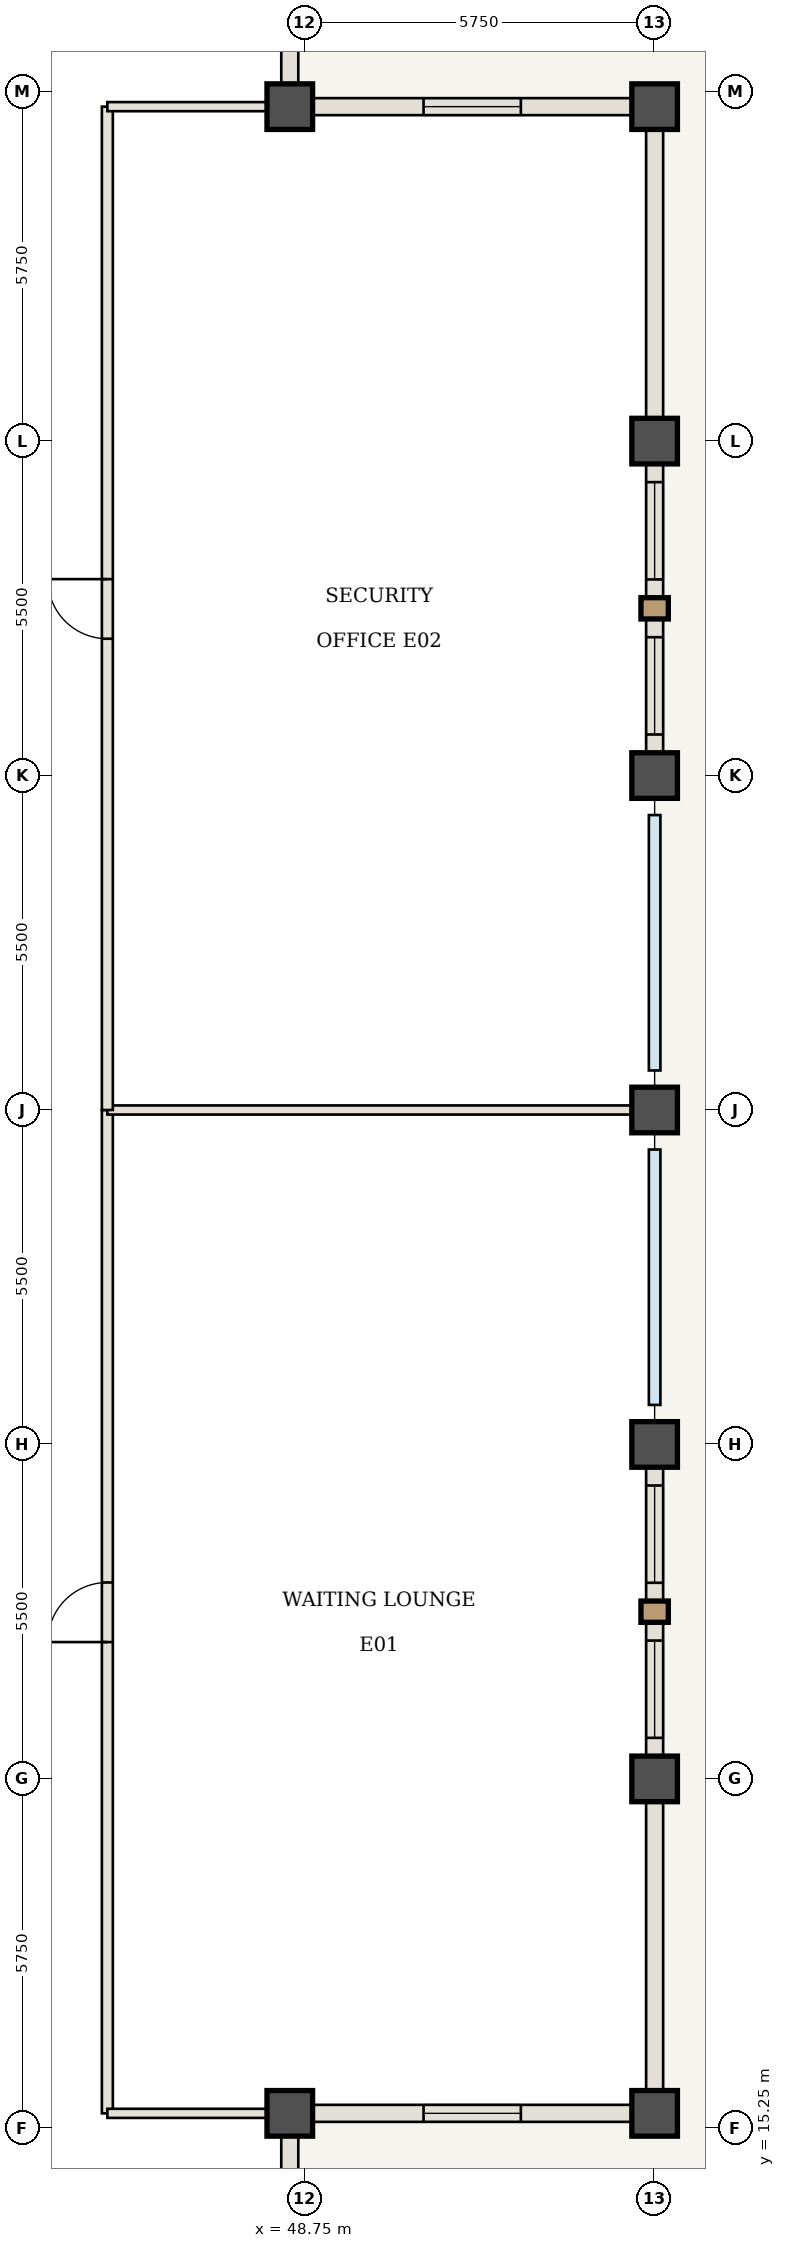
"""IFC4 building model, lengths in metres.
Left out: names, types, materials, properties, quantities, classifications, styles, units other than length and angle.
Written with IfcOpenShell. Run it as: python <this file> out.ifc"""

import sys

from ifc_helpers import new_model, si_unit, direction, frame, frame_2d, origin, origin_2d, place, context, subcontext, project, spatial, rectangle, extrude, element, fill, save


model = new_model("IFC4")
c1 = context("Model", 3, precision=1e-05, world=origin(), true_north=direction((0.0, 1.0)))
c2 = subcontext(c1, "Body", "Model", "MODEL_VIEW")
j1 = project(units=[si_unit("LENGTHUNIT", "METRE"), si_unit("PLANEANGLEUNIT", "RADIAN")], contexts=[c1])
p1 = place(None, origin())
s1 = spatial("IfcSite", under=j1, at=p1, CompositionType="ELEMENT")
p2 = place(p1, origin())
s2 = spatial("IfcBuilding", under=s1, at=p2, CompositionType="ELEMENT")
p3 = place(p2, frame((0.0, 0.0, 257.6)))
s3 = spatial("IfcBuildingStorey", under=s2, at=p3, CompositionType="ELEMENT", Elevation=257.6)
for number, where, z_axis, x_axis in (
    (1, (48.5, 15.5, -0.42), (0.0, 0.0, 1.0), (1.0, 0.0, 0.0)),
    (2, (54.5, 15.5, -0.42), (0.0, 0.0, 1.0), (1.0, 0.0, 0.0)),
    (3, (54.5, 48.5, -0.42), (0.0, 0.0, 1.0), (1.0, 0.0, 0.0)),
    (4, (48.5, 48.5, -0.42), (0.0, 0.0, 1.0), (1.0, 0.0, 0.0)),
    (5, (54.5, 21.0, -0.42), (0.0, 0.0, 1.0), (1.0, 0.0, 0.0)),
    (6, (54.5, 26.5, -0.42), (0.0, 0.0, 1.0), (1.0, 0.0, 0.0)),
    (7, (54.5, 32.0, -0.42), (0.0, 0.0, 1.0), (1.0, 0.0, 0.0)),
    (8, (54.5, 37.5, -0.42), (0.0, 0.0, 1.0), (1.0, 0.0, 0.0)),
    (9, (54.5, 43.0, -0.42), (0.0, 0.0, 1.0), (1.0, 0.0, 0.0)),
):
    element("IfcColumn", number, at=place(p3, frame(where, z_axis=z_axis, x_axis=x_axis)), inside=s3, PredefinedType="COLUMN", context=c2, shape_type="SweptSolid", body=[
        extrude(rectangle(XDim=0.75, YDim=0.75, at=origin_2d()), origin(), (0.0, 0.0, 1.0), 4.97),
    ])
p4 = place(p3, frame((45.5, 15.5, 0.0), z_axis=(0.0, 0.0, 1.0), x_axis=(0.0, 1.0, 0.0)))
e10 = element("IfcWall", 10, at=p4, inside=s3, PredefinedType="STANDARD", context=c2, shape_type="SweptSolid", body=[
    extrude(rectangle(XDim=16.5, YDim=0.18, at=frame_2d((8.25, 0.0))), origin(), (0.0, 0.0, 1.0), 4.13),
])
p5 = place(p4, frame((7.75, 0.0, 0.0)))
e11 = element("IfcOpeningElement", 11, at=p5, cuts=e10, PredefinedType="OPENING", context=c2, shape_type="SweptSolid", body=[
    extrude(rectangle(XDim=0.98, YDim=2.2, at=frame_2d((0.49, 1.1))), frame((0.0, 0.1, 0.0), z_axis=(0.0, -1.0, 0.0), x_axis=(1.0, 0.0, 0.0)), (0.0, 0.0, 1.0), 0.2),
])
p6 = place(p3, frame((45.5, 32.0, 0.0), z_axis=(0.0, 0.0, 1.0), x_axis=(1.0, 0.0, 0.0)))
e12 = element("IfcWall", 12, at=p6, inside=s3, PredefinedType="STANDARD", context=c2, shape_type="SweptSolid", body=[
    extrude(rectangle(XDim=8.94, YDim=0.15, at=frame_2d((4.47, 0.0))), origin(), (0.0, 0.0, 1.0), 3.585),
])
p7 = place(p3, frame((45.5, 32.0, 0.0), z_axis=(0.0, 0.0, 1.0), x_axis=(0.0, 1.0, 0.0)))
e13 = element("IfcWall", 13, at=p7, inside=s3, PredefinedType="STANDARD", context=c2, shape_type="SweptSolid", body=[
    extrude(rectangle(XDim=16.5, YDim=0.18, at=frame_2d((8.25, 0.0))), origin(), (0.0, 0.0, 1.0), 4.13),
])
p8 = place(p7, frame((7.75, 0.0, 0.0)))
e14 = element("IfcOpeningElement", 14, at=p8, cuts=e13, PredefinedType="OPENING", context=c2, shape_type="SweptSolid", body=[
    extrude(rectangle(XDim=0.98, YDim=2.2, at=frame_2d((0.49, 1.1))), frame((0.0, 0.1, 0.0), z_axis=(0.0, -1.0, 0.0), x_axis=(1.0, 0.0, 0.0)), (0.0, 0.0, 1.0), 0.2),
])
for number, where, z_axis, x_axis in (
    (15, (45.5, 15.5, 0.0), (0.0, 0.0, 1.0), (1.0, 0.0, 0.0)),
    (16, (45.5, 48.5, 0.0), (0.0, 0.0, 1.0), (1.0, 0.0, 0.0)),
):
    element("IfcWall", number, at=place(p3, frame(where, z_axis=z_axis, x_axis=x_axis)), inside=s3, PredefinedType="STANDARD", context=c2, shape_type="SweptSolid", body=[
        extrude(rectangle(XDim=3.0, YDim=0.15, at=frame_2d((1.5, 0.0))), origin(), (0.0, 0.0, 1.0), 4.13),
    ])
p9 = place(p3, frame((54.5, 21.0, 0.0), z_axis=(0.0, 0.0, 1.0), x_axis=(0.0, -1.0, 0.0)))
e17 = element("IfcWall", 17, at=p9, inside=s3, PredefinedType="USERDEFINED", context=c2, shape_type="SweptSolid", body=[
    extrude(rectangle(XDim=5.5, YDim=0.28, at=frame_2d((2.75, 0.0))), origin(), (0.0, 0.0, 1.0), 3.43),
])
p10 = place(p3, frame((54.5, 26.5, 0.0), z_axis=(0.0, 0.0, 1.0), x_axis=(0.0, -1.0, 0.0)))
e18 = element("IfcWall", 18, at=p10, inside=s3, PredefinedType="USERDEFINED", context=c2, shape_type="SweptSolid", body=[
    extrude(rectangle(XDim=5.5, YDim=0.28, at=frame_2d((2.75, 0.0))), origin(), (0.0, 0.0, 1.0), 3.43),
])
p11 = place(p10, frame((0.675, 0.0, 0.85)))
e19 = element("IfcOpeningElement", 19, at=p11, cuts=e18, PredefinedType="OPENING", context=c2, shape_type="SweptSolid", body=[
    extrude(rectangle(XDim=1.6, YDim=2.15, at=frame_2d((0.8, 1.075))), frame((0.0, 0.15, 0.0), z_axis=(0.0, -1.0, 0.0), x_axis=(1.0, 0.0, 0.0)), (0.0, 0.0, 1.0), 0.3),
])
p12 = place(p10, frame((3.225, 0.0, 0.85)))
e20 = element("IfcOpeningElement", 20, at=p12, cuts=e18, PredefinedType="OPENING", context=c2, shape_type="SweptSolid", body=[
    extrude(rectangle(XDim=1.6, YDim=2.15, at=frame_2d((0.8, 1.075))), frame((0.0, 0.15, 0.0), z_axis=(0.0, -1.0, 0.0), x_axis=(1.0, 0.0, 0.0)), (0.0, 0.0, 1.0), 0.3),
])
p13 = place(p3, frame((54.5, 43.0, 0.0), z_axis=(0.0, 0.0, 1.0), x_axis=(0.0, -1.0, 0.0)))
e21 = element("IfcWall", 21, at=p13, inside=s3, PredefinedType="USERDEFINED", context=c2, shape_type="SweptSolid", body=[
    extrude(rectangle(XDim=5.5, YDim=0.28, at=frame_2d((2.75, 0.0))), origin(), (0.0, 0.0, 1.0), 3.43),
])
p14 = place(p13, frame((0.675, 0.0, 0.85)))
e22 = element("IfcOpeningElement", 22, at=p14, cuts=e21, PredefinedType="OPENING", context=c2, shape_type="SweptSolid", body=[
    extrude(rectangle(XDim=1.6, YDim=2.15, at=frame_2d((0.8, 1.075))), frame((0.0, 0.15, 0.0), z_axis=(0.0, -1.0, 0.0), x_axis=(1.0, 0.0, 0.0)), (0.0, 0.0, 1.0), 0.3),
])
p15 = place(p13, frame((3.225, 0.0, 0.85)))
e23 = element("IfcOpeningElement", 23, at=p15, cuts=e21, PredefinedType="OPENING", context=c2, shape_type="SweptSolid", body=[
    extrude(rectangle(XDim=1.6, YDim=2.15, at=frame_2d((0.8, 1.075))), frame((0.0, 0.15, 0.0), z_axis=(0.0, -1.0, 0.0), x_axis=(1.0, 0.0, 0.0)), (0.0, 0.0, 1.0), 0.3),
])
p16 = place(p3, frame((54.5, 48.5, 0.0), z_axis=(0.0, 0.0, 1.0), x_axis=(0.0, -1.0, 0.0)))
e24 = element("IfcWall", 24, at=p16, inside=s3, PredefinedType="USERDEFINED", context=c2, shape_type="SweptSolid", body=[
    extrude(rectangle(XDim=5.5, YDim=0.28, at=frame_2d((2.75, 0.0))), origin(), (0.0, 0.0, 1.0), 3.43),
])
p17 = place(p3, frame((48.5, 15.5, 0.0), z_axis=(0.0, 0.0, 1.0), x_axis=(0.0, -1.0, 0.0)))
e25 = element("IfcWall", 25, at=p17, inside=s3, PredefinedType="USERDEFINED", context=c2, shape_type="SweptSolid", body=[
    extrude(rectangle(XDim=6.0, YDim=0.28, at=frame_2d((3.0, 0.0))), origin(), (0.0, 0.0, 1.0), 3.43),
])
p18 = place(p17, frame((2.2, 0.0, 0.85)))
e26 = element("IfcOpeningElement", 26, at=p18, cuts=e25, PredefinedType="OPENING", context=c2, shape_type="SweptSolid", body=[
    extrude(rectangle(XDim=1.6, YDim=2.05, at=frame_2d((0.8, 1.025))), frame((0.0, 0.15, 0.0), z_axis=(0.0, -1.0, 0.0), x_axis=(1.0, 0.0, 0.0)), (0.0, 0.0, 1.0), 0.3),
])
p19 = place(p3, frame((54.5, 15.5, 0.0), z_axis=(0.0, 0.0, 1.0), x_axis=(-1.0, 0.0, 0.0)))
e27 = element("IfcWall", 27, at=p19, inside=s3, PredefinedType="USERDEFINED", context=c2, shape_type="SweptSolid", body=[
    extrude(rectangle(XDim=6.0, YDim=0.28, at=frame_2d((3.0, 0.0))), origin(), (0.0, 0.0, 1.0), 3.43),
])
p20 = place(p19, frame((2.2, 0.0, 0.85)))
e28 = element("IfcOpeningElement", 28, at=p20, cuts=e27, PredefinedType="OPENING", context=c2, shape_type="SweptSolid", body=[
    extrude(rectangle(XDim=1.6, YDim=2.05, at=frame_2d((0.8, 1.025))), frame((0.0, 0.15, 0.0), z_axis=(0.0, -1.0, 0.0), x_axis=(1.0, 0.0, 0.0)), (0.0, 0.0, 1.0), 0.3),
])
p21 = place(p3, frame((48.5, 48.5, 0.0), z_axis=(0.0, 0.0, 1.0), x_axis=(1.0, 0.0, 0.0)))
e29 = element("IfcWall", 29, at=p21, inside=s3, PredefinedType="USERDEFINED", context=c2, shape_type="SweptSolid", body=[
    extrude(rectangle(XDim=6.0, YDim=0.28, at=frame_2d((3.0, 0.0))), origin(), (0.0, 0.0, 1.0), 3.43),
])
p22 = place(p21, frame((2.2, 0.0, 0.85)))
e30 = element("IfcOpeningElement", 30, at=p22, cuts=e29, PredefinedType="OPENING", context=c2, shape_type="SweptSolid", body=[
    extrude(rectangle(XDim=1.6, YDim=2.05, at=frame_2d((0.8, 1.025))), frame((0.0, 0.15, 0.0), z_axis=(0.0, -1.0, 0.0), x_axis=(1.0, 0.0, 0.0)), (0.0, 0.0, 1.0), 0.3),
])
p23 = place(p3, frame((48.5, 54.5, 0.0), z_axis=(0.0, 0.0, 1.0), x_axis=(0.0, -1.0, 0.0)))
e31 = element("IfcWall", 31, at=p23, inside=s3, PredefinedType="USERDEFINED", context=c2, shape_type="SweptSolid", body=[
    extrude(rectangle(XDim=6.0, YDim=0.28, at=frame_2d((3.0, 0.0))), origin(), (0.0, 0.0, 1.0), 3.43),
])
p24 = place(p23, frame((2.2, 0.0, 0.85)))
e32 = element("IfcOpeningElement", 32, at=p24, cuts=e31, PredefinedType="OPENING", context=c2, shape_type="SweptSolid", body=[
    extrude(rectangle(XDim=1.6, YDim=2.05, at=frame_2d((0.8, 1.025))), frame((0.0, 0.15, 0.0), z_axis=(0.0, -1.0, 0.0), x_axis=(1.0, 0.0, 0.0)), (0.0, 0.0, 1.0), 0.3),
])
p25 = place(p5, origin())
e33 = element("IfcDoor", 33, at=p25, inside=s3, OperationType="SINGLE_SWING_LEFT", PredefinedType="DOOR", context=c2, shape_type="SweptSolid", body=[
    extrude(rectangle(XDim=0.98, YDim=2.2, at=frame_2d((0.49, 1.1))), frame((0.0, 0.025, 0.0), z_axis=(0.0, -1.0, 0.0), x_axis=(1.0, 0.0, 0.0)), (0.0, 0.0, 1.0), 0.05),
])
fill(e11, e33)
p26 = place(p8, origin())
e34 = element("IfcDoor", 34, at=p26, inside=s3, OperationType="SINGLE_SWING_RIGHT", PredefinedType="DOOR", context=c2, shape_type="SweptSolid", body=[
    extrude(rectangle(XDim=0.98, YDim=2.2, at=frame_2d((0.49, 1.1))), frame((0.0, 0.025, 0.0), z_axis=(0.0, -1.0, 0.0), x_axis=(1.0, 0.0, 0.0)), (0.0, 0.0, 1.0), 0.05),
])
fill(e14, e34)
p27 = place(p11, origin())
e35 = element("IfcWindow", 35, at=p27, inside=s3, PartitioningType="SINGLE_PANEL", PredefinedType="WINDOW", context=c2, shape_type="SweptSolid", body=[
    extrude(rectangle(XDim=1.6, YDim=2.15, at=frame_2d((0.8, 1.075))), frame((0.0, 0.03, 0.0), z_axis=(0.0, -1.0, 0.0), x_axis=(1.0, 0.0, 0.0)), (0.0, 0.0, 1.0), 0.06),
])
fill(e19, e35)
p28 = place(p12, origin())
e36 = element("IfcWindow", 36, at=p28, inside=s3, PartitioningType="SINGLE_PANEL", PredefinedType="WINDOW", context=c2, shape_type="SweptSolid", body=[
    extrude(rectangle(XDim=1.6, YDim=2.15, at=frame_2d((0.8, 1.075))), frame((0.0, 0.03, 0.0), z_axis=(0.0, -1.0, 0.0), x_axis=(1.0, 0.0, 0.0)), (0.0, 0.0, 1.0), 0.06),
])
fill(e20, e36)
p29 = place(p14, origin())
e37 = element("IfcWindow", 37, at=p29, inside=s3, PartitioningType="SINGLE_PANEL", PredefinedType="WINDOW", context=c2, shape_type="SweptSolid", body=[
    extrude(rectangle(XDim=1.6, YDim=2.15, at=frame_2d((0.8, 1.075))), frame((0.0, 0.03, 0.0), z_axis=(0.0, -1.0, 0.0), x_axis=(1.0, 0.0, 0.0)), (0.0, 0.0, 1.0), 0.06),
])
fill(e22, e37)
p30 = place(p15, origin())
e38 = element("IfcWindow", 38, at=p30, inside=s3, PartitioningType="SINGLE_PANEL", PredefinedType="WINDOW", context=c2, shape_type="SweptSolid", body=[
    extrude(rectangle(XDim=1.6, YDim=2.15, at=frame_2d((0.8, 1.075))), frame((0.0, 0.03, 0.0), z_axis=(0.0, -1.0, 0.0), x_axis=(1.0, 0.0, 0.0)), (0.0, 0.0, 1.0), 0.06),
])
fill(e23, e38)
p31 = place(p20, origin())
e39 = element("IfcWindow", 39, at=p31, inside=s3, PartitioningType="SINGLE_PANEL", PredefinedType="WINDOW", context=c2, shape_type="SweptSolid", body=[
    extrude(rectangle(XDim=1.6, YDim=2.05, at=frame_2d((0.8, 1.025))), frame((0.0, 0.03, 0.0), z_axis=(0.0, -1.0, 0.0), x_axis=(1.0, 0.0, 0.0)), (0.0, 0.0, 1.0), 0.06),
])
fill(e28, e39)
p32 = place(p22, origin())
e40 = element("IfcWindow", 40, at=p32, inside=s3, PartitioningType="SINGLE_PANEL", PredefinedType="WINDOW", context=c2, shape_type="SweptSolid", body=[
    extrude(rectangle(XDim=1.6, YDim=2.05, at=frame_2d((0.8, 1.025))), frame((0.0, 0.03, 0.0), z_axis=(0.0, -1.0, 0.0), x_axis=(1.0, 0.0, 0.0)), (0.0, 0.0, 1.0), 0.06),
])
fill(e30, e40)
save(model, sys.argv[1])
